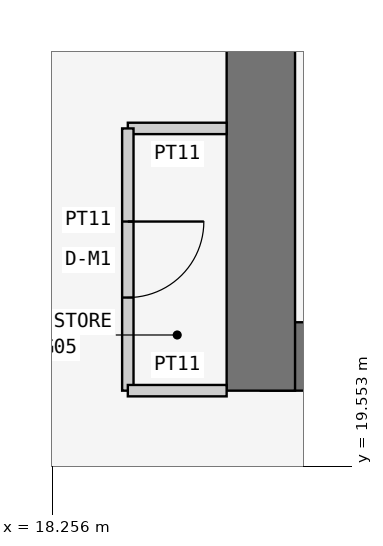
"""IFC4 building model, lengths in metres.
Left out: names, types, materials, properties, quantities, classifications, styles, units other than length and angle.
Written with IfcOpenShell. Run it as: python <this file> out.ifc"""

import sys

from ifc_helpers import new_model, si_unit, direction, frame, frame_2d, origin, place, context, subcontext, project, spatial, rectangle, extrude, element, fill, save


model = new_model("IFC4")
c1 = context("Model", 3, precision=1e-05, world=origin(), true_north=direction((0.0, 1.0)))
c2 = subcontext(c1, "Body", "Model", "MODEL_VIEW")
j1 = project(units=[si_unit("LENGTHUNIT", "METRE"), si_unit("PLANEANGLEUNIT", "RADIAN")], contexts=[c1])
p1 = place(None, origin())
s1 = spatial("IfcSite", under=j1, at=p1, CompositionType="ELEMENT")
p2 = place(p1, origin())
s2 = spatial("IfcBuilding", under=s1, at=p2, CompositionType="ELEMENT")
p3 = place(p2, frame((0.0, 0.0, 170.1)))
s3 = spatial("IfcBuildingStorey", under=s2, at=p3, CompositionType="ELEMENT", Elevation=170.1)
p4 = place(p3, frame((21.0, 21.0, 0.0), z_axis=(0.0, 0.0, 1.0), x_axis=(1.0, 0.0, 0.0)))
e1 = element("IfcWall", 1, at=p4, inside=s3, PredefinedType="SHEAR", context=c2, shape_type="SweptSolid", body=[
    extrude(rectangle(XDim=17.25, YDim=0.9, at=frame_2d((8.625, 0.0))), origin(), (0.0, 0.0, 1.0), 3.6),
])
p5 = place(p3, frame((21.0, 37.8, 0.0), z_axis=(0.0, 0.0, 1.0), x_axis=(0.0, -1.0, 0.0)))
e2 = element("IfcWall", 2, at=p5, inside=s3, PredefinedType="SHEAR", context=c2, shape_type="SweptSolid", body=[
    extrude(rectangle(XDim=17.25, YDim=0.9, at=frame_2d((8.625, 0.0))), origin(), (0.0, 0.0, 1.0), 3.6),
])
p6 = place(p5, frame((5.4, 0.0, 0.0)))
e3 = element("IfcOpeningElement", 3, at=p6, cuts=e2, PredefinedType="OPENING", context=c2, shape_type="SweptSolid", body=[
    extrude(rectangle(XDim=1.2, YDim=2.1, at=frame_2d((0.6, 1.05))), frame((0.0, 0.46, 0.0), z_axis=(0.0, -1.0, 0.0), x_axis=(1.0, 0.0, 0.0)), (0.0, 0.0, 1.0), 0.92),
])
p7 = place(p3, frame((20.55, 24.0, 0.0), z_axis=(0.0, 0.0, 1.0), x_axis=(-1.0, 0.0, 0.0)))
e4 = element("IfcWall", 4, at=p7, inside=s3, PredefinedType="PARTITIONING", context=c2, shape_type="SweptSolid", body=[
    extrude(rectangle(XDim=1.3, YDim=0.15, at=frame_2d((0.65, 0.0))), origin(), (0.0, 0.0, 1.0), 3.45),
])
p8 = place(p3, frame((19.25, 24.0, 0.0), z_axis=(0.0, 0.0, 1.0), x_axis=(0.0, -1.0, 0.0)))
e5 = element("IfcWall", 5, at=p8, inside=s3, PredefinedType="PARTITIONING", context=c2, shape_type="SweptSolid", body=[
    extrude(rectangle(XDim=3.45, YDim=0.15, at=frame_2d((1.725, 0.0))), origin(), (0.0, 0.0, 1.0), 3.45),
])
p9 = place(p8, frame((1.225, 0.0, 0.0)))
e6 = element("IfcOpeningElement", 6, at=p9, cuts=e5, PredefinedType="OPENING", context=c2, shape_type="SweptSolid", body=[
    extrude(rectangle(XDim=1.0, YDim=2.1, at=frame_2d((0.5, 1.05))), frame((0.0, 0.085, 0.0), z_axis=(0.0, -1.0, 0.0), x_axis=(1.0, 0.0, 0.0)), (0.0, 0.0, 1.0), 0.17),
])
p10 = place(p3, frame((19.25, 20.55, 0.0), z_axis=(0.0, 0.0, 1.0), x_axis=(1.0, 0.0, 0.0)))
e7 = element("IfcWall", 7, at=p10, inside=s3, PredefinedType="PARTITIONING", context=c2, shape_type="SweptSolid", body=[
    extrude(rectangle(XDim=1.3, YDim=0.15, at=frame_2d((0.65, 0.0))), origin(), (0.0, 0.0, 1.0), 3.45),
])
p11 = place(p9, origin())
e8 = element("IfcDoor", 8, at=p11, inside=s3, OperationType="SINGLE_SWING_LEFT", PredefinedType="DOOR", context=c2, shape_type="SweptSolid", body=[
    extrude(rectangle(XDim=1.0, YDim=2.1, at=frame_2d((0.5, 1.05))), frame((0.0, 0.025, 0.0), z_axis=(0.0, -1.0, 0.0), x_axis=(1.0, 0.0, 0.0)), (0.0, 0.0, 1.0), 0.05),
])
fill(e6, e8)
save(model, sys.argv[1])
